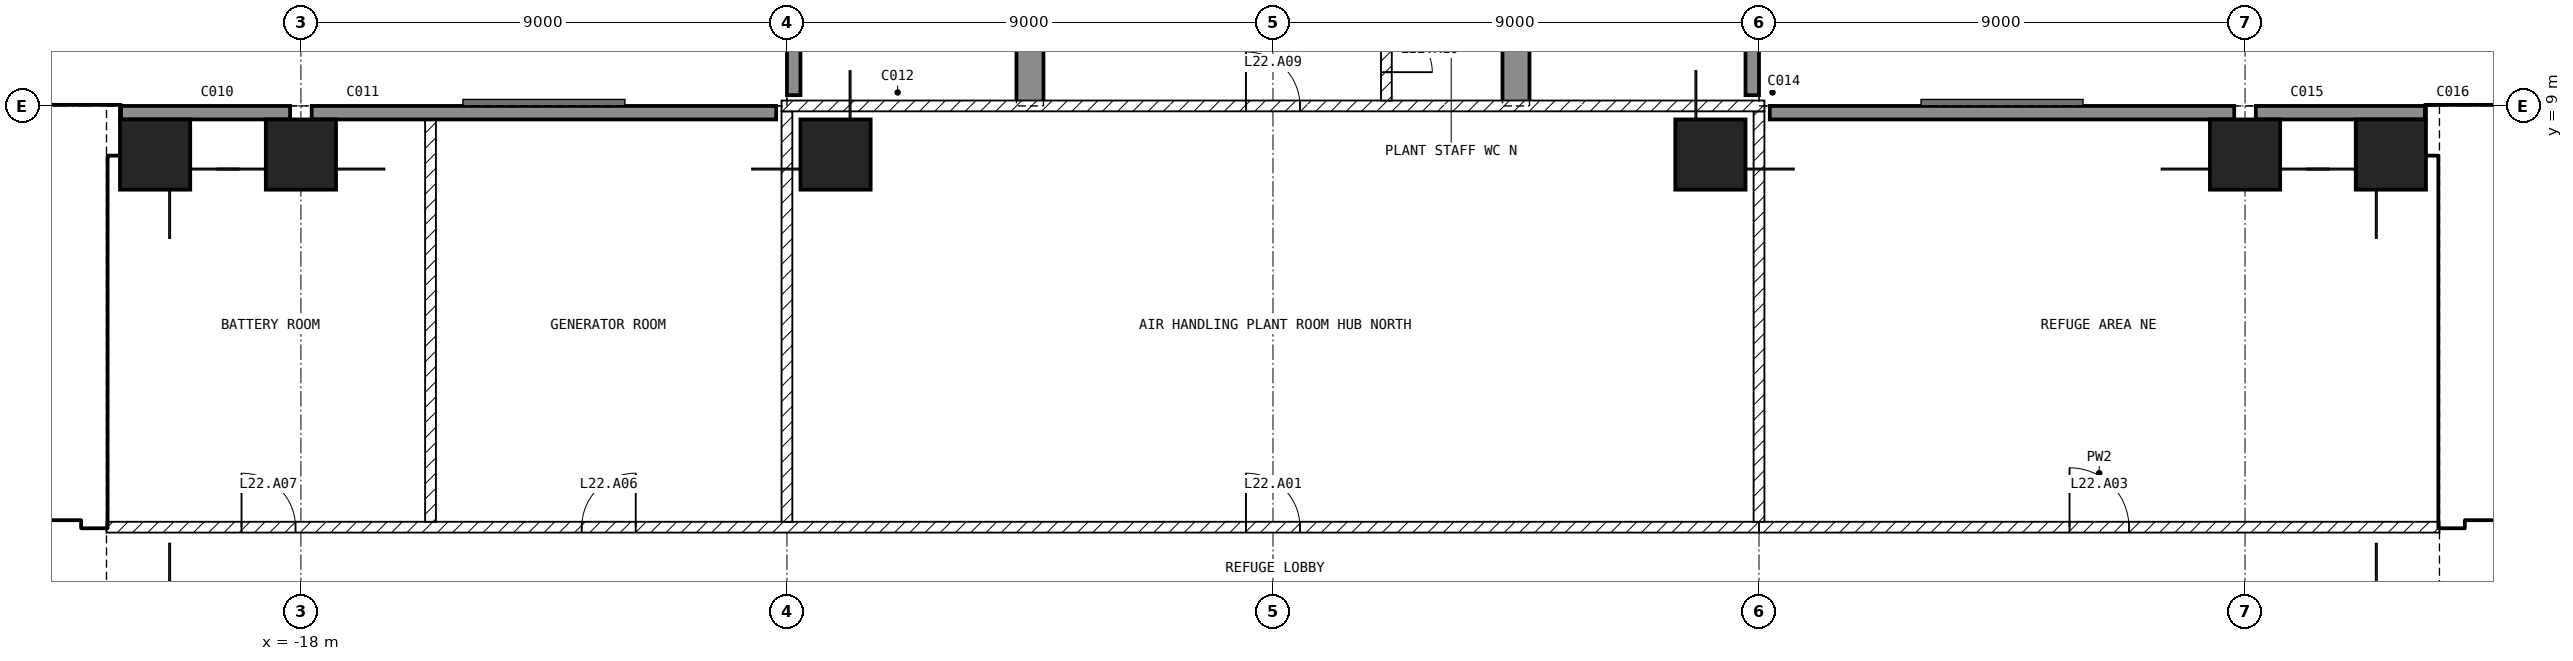
"""IFC4 building model, lengths in metres.
Left out: names, types, materials, properties, quantities, classifications, styles, units other than length and angle.
Written with IfcOpenShell. Run it as: python <this file> out.ifc"""

import sys

from ifc_helpers import new_model, si_unit, direction, frame, frame_2d, origin, origin_2d, place, context, subcontext, project, spatial, polyline, rectangle, outline, extrude, element, fill, save


model = new_model("IFC4")
c1 = context("Model", 3, precision=1e-05, world=origin(), true_north=direction((0.0, 1.0)))
c2 = subcontext(c1, "Body", "Model", "MODEL_VIEW")
j1 = project(units=[si_unit("LENGTHUNIT", "METRE"), si_unit("PLANEANGLEUNIT", "RADIAN")], contexts=[c1])
p1 = place(None, origin())
s1 = spatial("IfcSite", under=j1, at=p1, CompositionType="ELEMENT")
p2 = place(p1, origin())
s2 = spatial("IfcBuilding", under=s1, at=p2, CompositionType="ELEMENT")
p3 = place(p2, frame((0.0, 0.0, 97.9)))
s3 = spatial("IfcBuildingStorey", under=s2, at=p3, CompositionType="ELEMENT", Elevation=97.9)
for number, where, z_axis, x_axis in (
    (1, (-20.7, 8.1, -0.45), (0.0, 0.0, 1.0), (1.0, 0.0, 0.0)),
    (2, (-18.0, 8.1, -0.45), (0.0, 0.0, 1.0), (1.0, 0.0, 0.0)),
    (3, (-8.1, 8.1, -0.45), (0.0, 0.0, 1.0), (1.0, 0.0, 0.0)),
    (4, (8.1, 8.1, -0.45), (0.0, 0.0, 1.0), (1.0, 0.0, 0.0)),
    (5, (18.0, 8.1, -0.45), (0.0, 0.0, 1.0), (1.0, 0.0, 0.0)),
    (6, (20.7, 8.1, -0.45), (0.0, 0.0, 1.0), (1.0, 0.0, 0.0)),
):
    element("IfcColumn", number, at=place(p3, frame(where, z_axis=z_axis, x_axis=x_axis)), inside=s3, PredefinedType="COLUMN", context=c2, shape_type="SweptSolid", body=[
        extrude(rectangle(XDim=1.3, YDim=1.3, at=origin_2d()), origin(), (0.0, 0.0, 1.0), 4.7),
    ])
for number, where, z_axis, x_axis in (
    (7, (-4.75, 9.0, -0.45), (1.0, 0.0, 0.0), (0.0, 1.0, 0.0)),
    (8, (4.25, 9.0, -0.45), (1.0, 0.0, 0.0), (0.0, 1.0, 0.0)),
):
    element("IfcWall", number, at=place(p3, frame(where, z_axis=z_axis, x_axis=x_axis)), inside=s3, PredefinedType="SHEAR", context=c2, shape_type="SweptSolid", body=[
        extrude(outline(polyline([(0.0, 0.0), (2.1, 0.0), (2.1, 2.85), (4.5, 2.85), (4.5, 0.0), (9.9, 0.0), (9.9, 2.85), (12.3, 2.85), (12.3, 0.0), (16.45, 0.0), (16.45, 4.7), (0.0, 4.7), (0.0, 0.0)])), origin(), (0.0, 0.0, 1.0), 0.5),
    ])
p4 = place(p3, frame((21.35, 8.875, 0.0), z_axis=(0.0, 0.0, 1.0), x_axis=(-1.0, 0.0, 0.0)))
e9 = element("IfcWall", 9, at=p4, inside=s3, PredefinedType="SOLIDWALL", context=c2, shape_type="SweptSolid", body=[
    extrude(rectangle(XDim=3.15, YDim=0.25, at=frame_2d((1.575, 0.0))), origin(), (0.0, 0.0, 1.0), 4.25),
])
for number, where, z_axis, x_axis in (
    (10, (17.8, 8.875, 0.0), (0.0, 0.0, 1.0), (-1.0, 0.0, 0.0)),
    (11, (8.875, 9.2, 0.0), (0.0, 0.0, 1.0), (0.0, 1.0, 0.0)),
    (12, (-8.875, 17.8, 0.0), (0.0, 0.0, 1.0), (0.0, -1.0, 0.0)),
    (13, (-9.2, 8.875, 0.0), (0.0, 0.0, 1.0), (-1.0, 0.0, 0.0)),
):
    element("IfcWall", number, at=place(p3, frame(where, z_axis=z_axis, x_axis=x_axis)), inside=s3, PredefinedType="SOLIDWALL", context=c2, shape_type="SweptSolid", body=[
        extrude(rectangle(XDim=8.6, YDim=0.25, at=frame_2d((4.3, 0.0))), origin(), (0.0, 0.0, 1.0), 4.25),
    ])
p5 = place(p3, frame((-18.2, 8.875, 0.0), z_axis=(0.0, 0.0, 1.0), x_axis=(-1.0, 0.0, 0.0)))
e14 = element("IfcWall", 14, at=p5, inside=s3, PredefinedType="SOLIDWALL", context=c2, shape_type="SweptSolid", body=[
    extrude(rectangle(XDim=3.15, YDim=0.25, at=frame_2d((1.575, 0.0))), origin(), (0.0, 0.0, 1.0), 4.25),
])
p6 = place(p3, frame((21.35, 8.55, 0.0), z_axis=(0.0, 0.0, 1.0), x_axis=(1.0, 0.0, 0.0)))
e15 = element("IfcWall", 15, at=p6, inside=s3, PredefinedType="SHEAR", context=c2, shape_type="SweptSolid", body=[
    extrude(rectangle(XDim=10.15, YDim=0.9, at=frame_2d((5.075, 0.0))), origin(), (0.0, 0.0, 1.0), 4.25),
])
p7 = place(p3, frame((21.825, 1.2, 0.0), z_axis=(0.0, 0.0, 1.0), x_axis=(0.0, 1.0, 0.0)))
e16 = element("IfcWall", 16, at=p7, inside=s3, PredefinedType="SHEAR", context=c2, shape_type="SweptSolid", body=[
    extrude(rectangle(XDim=6.9, YDim=0.45, at=frame_2d((3.45, 0.0))), origin(), (0.0, 0.0, 1.0), 4.25),
])
p8 = place(p3, frame((22.05, 1.45, 0.0), z_axis=(0.0, 0.0, 1.0), x_axis=(1.0, 0.0, 0.0)))
e17 = element("IfcWall", 17, at=p8, inside=s3, PredefinedType="SOLIDWALL", context=c2, shape_type="SweptSolid", body=[
    extrude(rectangle(XDim=13.05, YDim=0.2, at=frame_2d((6.525, 0.0))), origin(), (0.0, 0.0, 1.0), 4.25),
])
p9 = place(p8, frame((0.75, 0.0, 0.0)))
e18 = element("IfcOpeningElement", 18, at=p9, cuts=e17, PredefinedType="OPENING", context=c2, shape_type="SweptSolid", body=[
    extrude(rectangle(XDim=1.0, YDim=2.1, at=frame_2d((0.5, 1.05))), frame((0.0, 0.11, 0.0), z_axis=(0.0, -1.0, 0.0), x_axis=(1.0, 0.0, 0.0)), (0.0, 0.0, 1.0), 0.22),
])
p10 = place(p8, frame((3.25, 0.0, 0.0)))
e19 = element("IfcOpeningElement", 19, at=p10, cuts=e17, PredefinedType="OPENING", context=c2, shape_type="SweptSolid", body=[
    extrude(rectangle(XDim=1.0, YDim=2.1, at=frame_2d((0.5, 1.05))), frame((0.0, 0.11, 0.0), z_axis=(0.0, -1.0, 0.0), x_axis=(1.0, 0.0, 0.0)), (0.0, 0.0, 1.0), 0.22),
])
p11 = place(p8, frame((10.0, 0.0, 0.0)))
e20 = element("IfcOpeningElement", 20, at=p11, cuts=e17, PredefinedType="OPENING", context=c2, shape_type="SweptSolid", body=[
    extrude(rectangle(XDim=0.9, YDim=2.1, at=frame_2d((0.45, 1.05))), frame((0.0, 0.11, 0.0), z_axis=(0.0, -1.0, 0.0), x_axis=(1.0, 0.0, 0.0)), (0.0, 0.0, 1.0), 0.22),
])
p12 = place(p3, frame((22.05, 5.15, 0.0), z_axis=(0.0, 0.0, 1.0), x_axis=(1.0, 0.0, 0.0)))
e21 = element("IfcWall", 21, at=p12, inside=s3, PredefinedType="SOLIDWALL", context=c2, shape_type="SweptSolid", body=[
    extrude(rectangle(XDim=6.3, YDim=0.2, at=frame_2d((3.15, 0.0))), origin(), (0.0, 0.0, 1.0), 4.25),
])
p13 = place(p12, frame((0.2, 0.0, 0.0)))
e22 = element("IfcOpeningElement", 22, at=p13, cuts=e21, PredefinedType="OPENING", context=c2, shape_type="SweptSolid", body=[
    extrude(rectangle(XDim=1.0, YDim=2.1, at=frame_2d((0.5, 1.05))), frame((0.0, 0.11, 0.0), z_axis=(0.0, -1.0, 0.0), x_axis=(1.0, 0.0, 0.0)), (0.0, 0.0, 1.0), 0.22),
])
p14 = place(p3, frame((-31.5, 8.55, 0.0), z_axis=(0.0, 0.0, 1.0), x_axis=(1.0, 0.0, 0.0)))
e23 = element("IfcWall", 23, at=p14, inside=s3, PredefinedType="SHEAR", context=c2, shape_type="SweptSolid", body=[
    extrude(rectangle(XDim=10.15, YDim=0.9, at=frame_2d((5.075, 0.0))), origin(), (0.0, 0.0, 1.0), 4.25),
])
p15 = place(p3, frame((-21.825, 1.2, 0.0), z_axis=(0.0, 0.0, 1.0), x_axis=(0.0, 1.0, 0.0)))
e24 = element("IfcWall", 24, at=p15, inside=s3, PredefinedType="SHEAR", context=c2, shape_type="SweptSolid", body=[
    extrude(rectangle(XDim=6.9, YDim=0.45, at=frame_2d((3.45, 0.0))), origin(), (0.0, 0.0, 1.0), 4.25),
])
p16 = place(p3, frame((-35.1, 1.45, 0.0), z_axis=(0.0, 0.0, 1.0), x_axis=(1.0, 0.0, 0.0)))
e25 = element("IfcWall", 25, at=p16, inside=s3, PredefinedType="SOLIDWALL", context=c2, shape_type="SweptSolid", body=[
    extrude(rectangle(XDim=13.05, YDim=0.2, at=frame_2d((6.525, 0.0))), origin(), (0.0, 0.0, 1.0), 4.25),
])
p17 = place(p16, frame((11.3, 0.0, 0.0)))
e26 = element("IfcOpeningElement", 26, at=p17, cuts=e25, PredefinedType="OPENING", context=c2, shape_type="SweptSolid", body=[
    extrude(rectangle(XDim=1.0, YDim=2.1, at=frame_2d((0.5, 1.05))), frame((0.0, 0.11, 0.0), z_axis=(0.0, -1.0, 0.0), x_axis=(1.0, 0.0, 0.0)), (0.0, 0.0, 1.0), 0.22),
])
p18 = place(p16, frame((8.8, 0.0, 0.0)))
e27 = element("IfcOpeningElement", 27, at=p18, cuts=e25, PredefinedType="OPENING", context=c2, shape_type="SweptSolid", body=[
    extrude(rectangle(XDim=1.0, YDim=2.1, at=frame_2d((0.5, 1.05))), frame((0.0, 0.11, 0.0), z_axis=(0.0, -1.0, 0.0), x_axis=(1.0, 0.0, 0.0)), (0.0, 0.0, 1.0), 0.22),
])
p19 = place(p16, frame((2.15, 0.0, 0.0)))
e28 = element("IfcOpeningElement", 28, at=p19, cuts=e25, PredefinedType="OPENING", context=c2, shape_type="SweptSolid", body=[
    extrude(rectangle(XDim=0.9, YDim=2.1, at=frame_2d((0.45, 1.05))), frame((0.0, 0.11, 0.0), z_axis=(0.0, -1.0, 0.0), x_axis=(1.0, 0.0, 0.0)), (0.0, 0.0, 1.0), 0.22),
])
p20 = place(p3, frame((-28.35, 5.15, 0.0), z_axis=(0.0, 0.0, 1.0), x_axis=(1.0, 0.0, 0.0)))
e29 = element("IfcWall", 29, at=p20, inside=s3, PredefinedType="SOLIDWALL", context=c2, shape_type="SweptSolid", body=[
    extrude(rectangle(XDim=6.3, YDim=0.2, at=frame_2d((3.15, 0.0))), origin(), (0.0, 0.0, 1.0), 4.25),
])
p21 = place(p20, frame((5.1, 0.0, 0.0)))
e30 = element("IfcOpeningElement", 30, at=p21, cuts=e29, PredefinedType="OPENING", context=c2, shape_type="SweptSolid", body=[
    extrude(rectangle(XDim=1.0, YDim=2.1, at=frame_2d((0.5, 1.05))), frame((0.0, 0.11, 0.0), z_axis=(0.0, -1.0, 0.0), x_axis=(1.0, 0.0, 0.0)), (0.0, 0.0, 1.0), 0.22),
])
p22 = place(p3, frame((-21.6, 1.2, 0.0), z_axis=(0.0, 0.0, 1.0), x_axis=(1.0, 0.0, 0.0)))
e31 = element("IfcWall", 31, at=p22, inside=s3, PredefinedType="PARTITIONING", context=c2, shape_type="SweptSolid", body=[
    extrude(rectangle(XDim=30.6, YDim=0.2, at=frame_2d((15.3, 0.0))), origin(), (0.0, 0.0, 1.0), 4.25),
])
p23 = place(p22, frame((21.1, 0.0, 0.0)))
e32 = element("IfcOpeningElement", 32, at=p23, cuts=e31, PredefinedType="OPENING", context=c2, shape_type="SweptSolid", body=[
    extrude(rectangle(XDim=1.0, YDim=2.1, at=frame_2d((0.5, 1.05))), frame((0.0, 0.11, 0.0), z_axis=(0.0, -1.0, 0.0), x_axis=(1.0, 0.0, 0.0)), (0.0, 0.0, 1.0), 0.22),
])
p24 = place(p22, frame((8.8, 0.0, 0.0)))
e33 = element("IfcOpeningElement", 33, at=p24, cuts=e31, PredefinedType="OPENING", context=c2, shape_type="SweptSolid", body=[
    extrude(rectangle(XDim=1.0, YDim=2.1, at=frame_2d((0.5, 1.05))), frame((0.0, 0.11, 0.0), z_axis=(0.0, -1.0, 0.0), x_axis=(1.0, 0.0, 0.0)), (0.0, 0.0, 1.0), 0.22),
])
p25 = place(p22, frame((2.5, 0.0, 0.0)))
e34 = element("IfcOpeningElement", 34, at=p25, cuts=e31, PredefinedType="OPENING", context=c2, shape_type="SweptSolid", body=[
    extrude(rectangle(XDim=1.0, YDim=2.1, at=frame_2d((0.5, 1.05))), frame((0.0, 0.11, 0.0), z_axis=(0.0, -1.0, 0.0), x_axis=(1.0, 0.0, 0.0)), (0.0, 0.0, 1.0), 0.22),
])
p26 = place(p3, frame((9.0, 1.2, 0.0), z_axis=(0.0, 0.0, 1.0), x_axis=(1.0, 0.0, 0.0)))
e35 = element("IfcWall", 35, at=p26, inside=s3, PredefinedType="PARTITIONING", context=c2, shape_type="SweptSolid", body=[
    extrude(rectangle(XDim=12.6, YDim=0.2, at=frame_2d((6.3, 0.0))), origin(), (0.0, 0.0, 1.0), 4.25),
])
p27 = place(p26, frame((5.75, 0.0, 0.0)))
e36 = element("IfcOpeningElement", 36, at=p27, cuts=e35, PredefinedType="OPENING", context=c2, shape_type="SweptSolid", body=[
    extrude(rectangle(XDim=1.1, YDim=2.1, at=frame_2d((0.55, 1.05))), frame((0.0, 0.11, 0.0), z_axis=(0.0, -1.0, 0.0), x_axis=(1.0, 0.0, 0.0)), (0.0, 0.0, 1.0), 0.22),
])
for number, where, z_axis, x_axis in (
    (37, (9.0, 8.9, 0.0), (0.0, 0.0, 1.0), (0.0, -1.0, 0.0)),
    (38, (-9.0, 1.3, 0.0), (0.0, 0.0, 1.0), (0.0, 1.0, 0.0)),
):
    element("IfcWall", number, at=place(p3, frame(where, z_axis=z_axis, x_axis=x_axis)), inside=s3, PredefinedType="PARTITIONING", context=c2, shape_type="SweptSolid", body=[
        extrude(rectangle(XDim=7.6, YDim=0.2, at=frame_2d((3.8, 0.0))), origin(), (0.0, 0.0, 1.0), 4.25),
    ])
p28 = place(p3, frame((-9.1, 9.0, 0.0), z_axis=(0.0, 0.0, 1.0), x_axis=(1.0, 0.0, 0.0)))
e39 = element("IfcWall", 39, at=p28, inside=s3, PredefinedType="PARTITIONING", context=c2, shape_type="SweptSolid", body=[
    extrude(rectangle(XDim=18.2, YDim=0.2, at=frame_2d((9.1, 0.0))), origin(), (0.0, 0.0, 1.0), 4.25),
])
p29 = place(p28, frame((8.6, 0.0, 0.0)))
e40 = element("IfcOpeningElement", 40, at=p29, cuts=e39, PredefinedType="OPENING", context=c2, shape_type="SweptSolid", body=[
    extrude(rectangle(XDim=1.0, YDim=2.1, at=frame_2d((0.5, 1.05))), frame((0.0, 0.11, 0.0), z_axis=(0.0, -1.0, 0.0), x_axis=(1.0, 0.0, 0.0)), (0.0, 0.0, 1.0), 0.22),
])
p30 = place(p3, frame((-15.6, 1.3, 0.0), z_axis=(0.0, 0.0, 1.0), x_axis=(0.0, 1.0, 0.0)))
e41 = element("IfcWall", 41, at=p30, inside=s3, PredefinedType="PARTITIONING", context=c2, shape_type="SweptSolid", body=[
    extrude(rectangle(XDim=7.6, YDim=0.2, at=frame_2d((3.8, 0.0))), origin(), (0.0, 0.0, 1.0), 4.25),
])
p31 = place(p3, frame((2.1, 11.0, 0.0), z_axis=(0.0, 0.0, 1.0), x_axis=(0.0, -1.0, 0.0)))
e42 = element("IfcWall", 42, at=p31, inside=s3, PredefinedType="PARTITIONING", context=c2, shape_type="SweptSolid", body=[
    extrude(rectangle(XDim=1.9, YDim=0.2, at=frame_2d((0.95, 0.0))), origin(), (0.0, 0.0, 1.0), 4.25),
])
p32 = place(p31, frame((0.525, 0.0, 0.0)))
e43 = element("IfcOpeningElement", 43, at=p32, cuts=e42, PredefinedType="OPENING", context=c2, shape_type="SweptSolid", body=[
    extrude(rectangle(XDim=0.85, YDim=2.1, at=frame_2d((0.425, 1.05))), frame((0.0, 0.11, 0.0), z_axis=(0.0, -1.0, 0.0), x_axis=(1.0, 0.0, 0.0)), (0.0, 0.0, 1.0), 0.22),
])
p33 = place(p13, origin())
e44 = element("IfcDoor", 44, at=p33, inside=s3, OperationType="SINGLE_SWING_LEFT", PredefinedType="DOOR", context=c2, shape_type="SweptSolid", body=[
    extrude(rectangle(XDim=1.0, YDim=2.1, at=frame_2d((0.5, 1.05))), frame((0.0, 0.025, 0.0), z_axis=(0.0, -1.0, 0.0), x_axis=(1.0, 0.0, 0.0)), (0.0, 0.0, 1.0), 0.05),
])
fill(e22, e44)
p34 = place(p21, origin())
e45 = element("IfcDoor", 45, at=p34, inside=s3, OperationType="SINGLE_SWING_LEFT", PredefinedType="DOOR", context=c2, shape_type="SweptSolid", body=[
    extrude(rectangle(XDim=1.0, YDim=2.1, at=frame_2d((0.5, 1.05))), frame((0.0, 0.025, 0.0), z_axis=(0.0, -1.0, 0.0), x_axis=(1.0, 0.0, 0.0)), (0.0, 0.0, 1.0), 0.05),
])
fill(e30, e45)
p35 = place(p23, origin())
e46 = element("IfcDoor", 46, at=p35, inside=s3, OperationType="SINGLE_SWING_LEFT", PredefinedType="DOOR", context=c2, shape_type="SweptSolid", body=[
    extrude(rectangle(XDim=1.0, YDim=2.1, at=frame_2d((0.5, 1.05))), frame((0.0, 0.025, 0.0), z_axis=(0.0, -1.0, 0.0), x_axis=(1.0, 0.0, 0.0)), (0.0, 0.0, 1.0), 0.05),
])
fill(e32, e46)
p36 = place(p27, origin())
e47 = element("IfcDoor", 47, at=p36, inside=s3, OperationType="SINGLE_SWING_LEFT", PredefinedType="DOOR", context=c2, shape_type="SweptSolid", body=[
    extrude(rectangle(XDim=1.1, YDim=2.1, at=frame_2d((0.55, 1.05))), frame((0.0, 0.025, 0.0), z_axis=(0.0, -1.0, 0.0), x_axis=(1.0, 0.0, 0.0)), (0.0, 0.0, 1.0), 0.05),
])
fill(e36, e47)
p37 = place(p24, origin())
e48 = element("IfcDoor", 48, at=p37, inside=s3, OperationType="SINGLE_SWING_RIGHT", PredefinedType="DOOR", context=c2, shape_type="SweptSolid", body=[
    extrude(rectangle(XDim=1.0, YDim=2.1, at=frame_2d((0.5, 1.05))), frame((0.0, 0.025, 0.0), z_axis=(0.0, -1.0, 0.0), x_axis=(1.0, 0.0, 0.0)), (0.0, 0.0, 1.0), 0.05),
])
fill(e33, e48)
p38 = place(p25, origin())
e49 = element("IfcDoor", 49, at=p38, inside=s3, OperationType="SINGLE_SWING_LEFT", PredefinedType="DOOR", context=c2, shape_type="SweptSolid", body=[
    extrude(rectangle(XDim=1.0, YDim=2.1, at=frame_2d((0.5, 1.05))), frame((0.0, 0.025, 0.0), z_axis=(0.0, -1.0, 0.0), x_axis=(1.0, 0.0, 0.0)), (0.0, 0.0, 1.0), 0.05),
])
fill(e34, e49)
p39 = place(p29, origin())
e50 = element("IfcDoor", 50, at=p39, inside=s3, OperationType="SINGLE_SWING_LEFT", PredefinedType="DOOR", context=c2, shape_type="SweptSolid", body=[
    extrude(rectangle(XDim=1.0, YDim=2.1, at=frame_2d((0.5, 1.05))), frame((0.0, 0.025, 0.0), z_axis=(0.0, -1.0, 0.0), x_axis=(1.0, 0.0, 0.0)), (0.0, 0.0, 1.0), 0.05),
])
fill(e40, e50)
p40 = place(p32, origin())
e51 = element("IfcDoor", 51, at=p40, inside=s3, OperationType="SINGLE_SWING_RIGHT", PredefinedType="DOOR", context=c2, shape_type="SweptSolid", body=[
    extrude(rectangle(XDim=0.85, YDim=2.1, at=frame_2d((0.425, 1.05))), frame((0.0, 0.025, 0.0), z_axis=(0.0, -1.0, 0.0), x_axis=(1.0, 0.0, 0.0)), (0.0, 0.0, 1.0), 0.05),
])
fill(e43, e51)
save(model, sys.argv[1])
